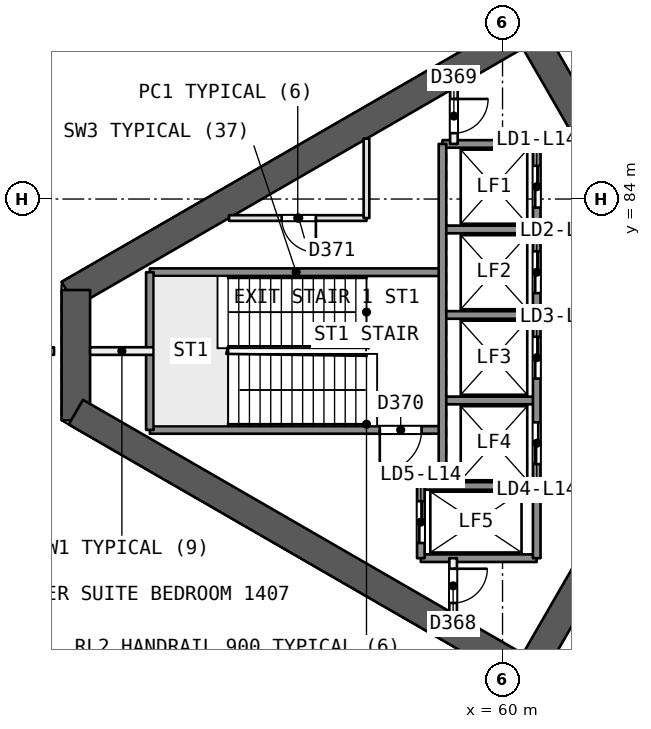
"""IFC4 building model, lengths in metres.
Left out: names, types, materials, properties, quantities, classifications, styles, units other than length and angle.
Written with IfcOpenShell. Run it as: python <this file> out.ifc"""

import sys

from ifc_helpers import new_model, si_unit, direction, frame, frame_2d, origin, place, context, subcontext, project, spatial, rectangle, extrude, element, fill, save


model = new_model("IFC4")
c1 = context("Model", 3, precision=1e-05, world=origin(), true_north=direction((0.0, 1.0)))
c2 = subcontext(c1, "Body", "Model", "MODEL_VIEW")
j1 = project(units=[si_unit("LENGTHUNIT", "METRE"), si_unit("PLANEANGLEUNIT", "RADIAN")], contexts=[c1])
p1 = place(None, origin())
s1 = spatial("IfcSite", under=j1, at=p1, CompositionType="ELEMENT")
p2 = place(p1, origin())
s2 = spatial("IfcBuilding", under=s1, at=p2, CompositionType="ELEMENT")
p3 = place(p2, frame((0.0, 0.0, 64.7)))
s3 = spatial("IfcBuildingStorey", under=s2, at=p3, CompositionType="ELEMENT", Elevation=64.7)
p4 = place(p3, frame((65.567, 80.0, 0.0), z_axis=(0.0, 0.0, 1.0), x_axis=(-0.499988615364, 0.866031976607, 0.0)))
e1 = element("IfcWall", 1, at=p4, inside=s3, PredefinedType="SHEAR", context=c2, shape_type="SweptSolid", body=[
    extrude(rectangle(XDim=10.163, YDim=0.75, at=frame_2d((5.082, 0.0))), origin(), (0.0, 0.0, 1.0), 3.7),
])
p5 = place(p4, frame((0.733, 0.0, 0.0)))
e2 = element("IfcOpeningElement", 2, at=p5, cuts=e1, PredefinedType="OPENING", context=c2, shape_type="SweptSolid", body=[
    extrude(rectangle(XDim=1.2, YDim=2.1, at=frame_2d((0.6, 1.05))), frame((0.0, 0.385, 0.0), z_axis=(0.0, -1.0, 0.0), x_axis=(1.0, 0.0, 0.0)), (0.0, 0.0, 1.0), 0.771),
])
p6 = place(p3, frame((60.673, 88.477, 0.0), z_axis=(0.0, 0.0, 1.0), x_axis=(-0.8660248072, -0.500001033313, 0.0)))
e3 = element("IfcWall", 3, at=p6, inside=s3, PredefinedType="SHEAR", context=c2, shape_type="SweptSolid", body=[
    extrude(rectangle(XDim=13.958, YDim=0.75, at=frame_2d((6.979, 0.0))), origin(), (0.0, 0.0, 1.0), 3.7),
])
p7 = place(p3, frame((48.772, 81.606, 0.0), z_axis=(0.0, 0.0, 1.0), x_axis=(0.0, -1.0, 0.0)))
e4 = element("IfcWall", 4, at=p7, inside=s3, PredefinedType="SHEAR", context=c2, shape_type="SweptSolid", body=[
    extrude(rectangle(XDim=3.429, YDim=0.75, at=frame_2d((1.714, 0.0))), origin(), (0.0, 0.0, 1.0), 3.7),
])
p8 = place(p3, frame((48.772, 78.394, 0.0), z_axis=(0.0, 0.0, 1.0), x_axis=(0.866028339916, -0.499994914436, 0.0)))
e5 = element("IfcWall", 5, at=p8, inside=s3, PredefinedType="SHEAR", context=c2, shape_type="SweptSolid", body=[
    extrude(rectangle(XDim=14.117, YDim=0.75, at=frame_2d((7.059, 0.0))), origin(), (0.0, 0.0, 1.0), 3.7),
])
p9 = place(p3, frame((60.673, 71.523, 0.0), z_axis=(0.0, 0.0, 1.0), x_axis=(0.499997052475, 0.866027105532, 0.0)))
e6 = element("IfcWall", 6, at=p9, inside=s3, PredefinedType="SHEAR", context=c2, shape_type="SweptSolid", body=[
    extrude(rectangle(XDim=10.005, YDim=0.75, at=frame_2d((5.002, 0.0))), origin(), (0.0, 0.0, 1.0), 3.7),
])
p10 = place(p9, frame((7.855, 0.0, 0.0)))
e7 = element("IfcOpeningElement", 7, at=p10, cuts=e6, PredefinedType="OPENING", context=c2, shape_type="SweptSolid", body=[
    extrude(rectangle(XDim=1.2, YDim=2.1, at=frame_2d((0.6, 1.05))), frame((0.0, 0.385, 0.0), z_axis=(0.0, -1.0, 0.0), x_axis=(1.0, 0.0, 0.0)), (0.0, 0.0, 1.0), 0.771),
])
p11 = place(p3, frame((38.851, 80.0, 0.0), z_axis=(0.0, 0.0, 1.0), x_axis=(1.0, 0.0, 0.0)))
e8 = element("IfcWall", 8, at=p11, inside=s3, PredefinedType="PARTITIONING", context=c2, shape_type="SweptSolid", body=[
    extrude(rectangle(XDim=9.347, YDim=0.2, at=frame_2d((4.674, 0.0))), origin(), (0.0, 0.0, 1.0), 3.2),
])
p12 = place(p3, frame((38.701, 83.06, 0.0), z_axis=(0.0, 0.0, 1.0), x_axis=(0.866026049211, 0.499998882086, 0.0)))
e9 = element("IfcWall", 9, at=p12, inside=s3, PredefinedType="SOLIDWALL", context=c2, shape_type="SweptSolid", body=[
    extrude(rectangle(XDim=59.811, YDim=0.3, at=frame_2d((29.905, 0.0))), origin(), (0.0, 0.0, 1.0), 3.2),
])
p13 = place(p12, frame((33.382, 0.0, 0.0)))
e10 = element("IfcOpeningElement", 10, at=p13, cuts=e9, PredefinedType="OPENING", context=c2, shape_type="SweptSolid", body=[
    extrude(rectangle(XDim=2.4, YDim=2.4, at=frame_2d((1.2, 1.2))), frame((0.0, 0.161, 0.0), z_axis=(0.0, -1.0, 0.0), x_axis=(1.0, 0.0, 0.0)), (0.0, 0.0, 1.0), 0.321),
])
p14 = place(p12, frame((46.394, 0.0, 0.0)))
e11 = element("IfcOpeningElement", 11, at=p14, cuts=e9, PredefinedType="OPENING", context=c2, shape_type="SweptSolid", body=[
    extrude(rectangle(XDim=2.4, YDim=2.4, at=frame_2d((1.2, 1.2))), frame((0.0, 0.161, 0.0), z_axis=(0.0, -1.0, 0.0), x_axis=(1.0, 0.0, 0.0)), (0.0, 0.0, 1.0), 0.321),
])
p15 = place(p12, frame((24.029, 0.0, 0.0)))
e12 = element("IfcOpeningElement", 12, at=p15, cuts=e9, PredefinedType="OPENING", context=c2, shape_type="SweptSolid", body=[
    extrude(rectangle(XDim=2.4, YDim=2.4, at=frame_2d((1.2, 1.2))), frame((0.0, 0.161, 0.0), z_axis=(0.0, -1.0, 0.0), x_axis=(1.0, 0.0, 0.0)), (0.0, 0.0, 1.0), 0.321),
])
p16 = place(p12, frame((11.002, 0.0, 0.0)))
e13 = element("IfcOpeningElement", 13, at=p16, cuts=e9, PredefinedType="OPENING", context=c2, shape_type="SweptSolid", body=[
    extrude(rectangle(XDim=2.4, YDim=2.4, at=frame_2d((1.2, 1.2))), frame((0.0, 0.161, 0.0), z_axis=(0.0, -1.0, 0.0), x_axis=(1.0, 0.0, 0.0)), (0.0, 0.0, 1.0), 0.321),
])
p17 = place(p12, frame((28.705, 0.0, 0.0)))
e14 = element("IfcOpeningElement", 14, at=p17, cuts=e9, PredefinedType="OPENING", context=c2, shape_type="SweptSolid", body=[
    extrude(rectangle(XDim=2.4, YDim=2.4, at=frame_2d((1.2, 1.2))), frame((0.0, 0.161, 0.0), z_axis=(0.0, -1.0, 0.0), x_axis=(1.0, 0.0, 0.0)), (0.0, 0.0, 1.0), 0.321),
])
p18 = place(p3, frame((90.499, 47.034, 0.0), z_axis=(0.0, 0.0, 1.0), x_axis=(-0.866026049211, 0.499998882086, 0.0)))
e15 = element("IfcWall", 15, at=p18, inside=s3, PredefinedType="SOLIDWALL", context=c2, shape_type="SweptSolid", body=[
    extrude(rectangle(XDim=59.811, YDim=0.3, at=frame_2d((29.905, 0.0))), origin(), (0.0, 0.0, 1.0), 3.2),
])
p19 = place(p18, frame((28.705, 0.0, 0.0)))
e16 = element("IfcOpeningElement", 16, at=p19, cuts=e15, PredefinedType="OPENING", context=c2, shape_type="SweptSolid", body=[
    extrude(rectangle(XDim=2.4, YDim=2.4, at=frame_2d((1.2, 1.2))), frame((0.0, 0.161, 0.0), z_axis=(0.0, -1.0, 0.0), x_axis=(1.0, 0.0, 0.0)), (0.0, 0.0, 1.0), 0.321),
])
p20 = place(p18, frame((34.161, 0.0, 0.0)))
e17 = element("IfcOpeningElement", 17, at=p20, cuts=e15, PredefinedType="OPENING", context=c2, shape_type="SweptSolid", body=[
    extrude(rectangle(XDim=2.4, YDim=2.4, at=frame_2d((1.2, 1.2))), frame((0.0, 0.161, 0.0), z_axis=(0.0, -1.0, 0.0), x_axis=(1.0, 0.0, 0.0)), (0.0, 0.0, 1.0), 0.321),
])
p21 = place(p18, frame((46.394, 0.0, 0.0)))
e18 = element("IfcOpeningElement", 18, at=p21, cuts=e15, PredefinedType="OPENING", context=c2, shape_type="SweptSolid", body=[
    extrude(rectangle(XDim=2.4, YDim=2.4, at=frame_2d((1.2, 1.2))), frame((0.0, 0.161, 0.0), z_axis=(0.0, -1.0, 0.0), x_axis=(1.0, 0.0, 0.0)), (0.0, 0.0, 1.0), 0.321),
])
p22 = place(p18, frame((23.249, 0.0, 0.0)))
e19 = element("IfcOpeningElement", 19, at=p22, cuts=e15, PredefinedType="OPENING", context=c2, shape_type="SweptSolid", body=[
    extrude(rectangle(XDim=2.4, YDim=2.4, at=frame_2d((1.2, 1.2))), frame((0.0, 0.161, 0.0), z_axis=(0.0, -1.0, 0.0), x_axis=(1.0, 0.0, 0.0)), (0.0, 0.0, 1.0), 0.321),
])
p23 = place(p18, frame((11.002, 0.0, 0.0)))
e20 = element("IfcOpeningElement", 20, at=p23, cuts=e15, PredefinedType="OPENING", context=c2, shape_type="SweptSolid", body=[
    extrude(rectangle(XDim=2.4, YDim=2.4, at=frame_2d((1.2, 1.2))), frame((0.0, 0.161, 0.0), z_axis=(0.0, -1.0, 0.0), x_axis=(1.0, 0.0, 0.0)), (0.0, 0.0, 1.0), 0.321),
])
p24 = place(p3, frame((60.9, 85.45, 0.0), z_axis=(0.0, 0.0, 1.0), x_axis=(-1.0, 0.0, 0.0)))
e21 = element("IfcWall", 21, at=p24, inside=s3, PredefinedType="SOLIDWALL", context=c2, shape_type="SweptSolid", body=[
    extrude(rectangle(XDim=2.48, YDim=0.2, at=frame_2d((1.24, 0.0))), origin(), (0.0, 0.0, 1.0), 3.2),
])
p25 = place(p3, frame((56.42, 83.5, 0.0), z_axis=(0.0, 0.0, 1.0), x_axis=(-1.0, 0.0, 0.0)))
e22 = element("IfcWall", 22, at=p25, inside=s3, PredefinedType="PARTITIONING", context=c2, shape_type="SweptSolid", body=[
    extrude(rectangle(XDim=3.618, YDim=0.15, at=frame_2d((1.809, 0.0))), origin(), (0.0, 0.0, 1.0), 3.2),
])
p26 = place(p25, frame((1.332, 0.0, 0.0)))
e23 = element("IfcOpeningElement", 23, at=p26, cuts=e22, PredefinedType="OPENING", context=c2, shape_type="SweptSolid", body=[
    extrude(rectangle(XDim=0.9, YDim=2.1, at=frame_2d((0.45, 1.05))), frame((0.0, 0.085, 0.0), z_axis=(0.0, -1.0, 0.0), x_axis=(1.0, 0.0, 0.0)), (0.0, 0.0, 1.0), 0.171),
])
p27 = place(p3, frame((60.9, 83.2, 0.0), z_axis=(0.0, 0.0, 1.0), x_axis=(-1.0, 0.0, 0.0)))
e24 = element("IfcWall", 24, at=p27, inside=s3, PredefinedType="SOLIDWALL", context=c2, shape_type="SweptSolid", body=[
    extrude(rectangle(XDim=2.48, YDim=0.2, at=frame_2d((1.24, 0.0))), origin(), (0.0, 0.0, 1.0), 3.2),
])
p28 = place(p3, frame((58.42, 82.075, 0.0), z_axis=(0.0, 0.0, 1.0), x_axis=(-1.0, 0.0, 0.0)))
e25 = element("IfcWall", 25, at=p28, inside=s3, PredefinedType="SOLIDWALL", context=c2, shape_type="SweptSolid", body=[
    extrude(rectangle(XDim=7.7, YDim=0.2, at=frame_2d((3.85, 0.0))), origin(), (0.0, 0.0, 1.0), 3.2),
])
p29 = place(p3, frame((60.9, 80.95, 0.0), z_axis=(0.0, 0.0, 1.0), x_axis=(-1.0, 0.0, 0.0)))
e26 = element("IfcWall", 26, at=p29, inside=s3, PredefinedType="SOLIDWALL", context=c2, shape_type="SweptSolid", body=[
    extrude(rectangle(XDim=2.48, YDim=0.2, at=frame_2d((1.24, 0.0))), origin(), (0.0, 0.0, 1.0), 3.2),
])
p30 = place(p3, frame((50.82, 80.0, 0.0), z_axis=(0.0, 0.0, 1.0), x_axis=(-1.0, 0.0, 0.0)))
e27 = element("IfcWall", 27, at=p30, inside=s3, PredefinedType="PARTITIONING", context=c2, shape_type="SweptSolid", body=[
    extrude(rectangle(XDim=1.673, YDim=0.2, at=frame_2d((0.836, 0.0))), origin(), (0.0, 0.0, 1.0), 3.2),
])
p31 = place(p3, frame((60.9, 78.7, 0.0), z_axis=(0.0, 0.0, 1.0), x_axis=(-1.0, 0.0, 0.0)))
e28 = element("IfcWall", 28, at=p31, inside=s3, PredefinedType="SOLIDWALL", context=c2, shape_type="SweptSolid", body=[
    extrude(rectangle(XDim=2.48, YDim=0.2, at=frame_2d((1.24, 0.0))), origin(), (0.0, 0.0, 1.0), 3.2),
])
p32 = place(p3, frame((58.42, 77.925, 0.0), z_axis=(0.0, 0.0, 1.0), x_axis=(-1.0, 0.0, 0.0)))
e29 = element("IfcWall", 29, at=p32, inside=s3, PredefinedType="SOLIDWALL", context=c2, shape_type="SweptSolid", body=[
    extrude(rectangle(XDim=7.7, YDim=0.2, at=frame_2d((3.85, 0.0))), origin(), (0.0, 0.0, 1.0), 3.2),
])
p33 = place(p32, frame((0.55, 0.0, 0.0)))
e30 = element("IfcOpeningElement", 30, at=p33, cuts=e29, PredefinedType="OPENING", context=c2, shape_type="SweptSolid", body=[
    extrude(rectangle(XDim=1.1, YDim=2.1, at=frame_2d((0.55, 1.05))), frame((0.0, 0.11, 0.0), z_axis=(0.0, -1.0, 0.0), x_axis=(1.0, 0.0, 0.0)), (0.0, 0.0, 1.0), 0.221),
])
for number, where, z_axis, x_axis in (
    (31, (60.9, 76.45, 0.0), (0.0, 0.0, 1.0), (-1.0, 0.0, 0.0)),
    (32, (60.9, 74.55, 0.0), (0.0, 0.0, 1.0), (-1.0, 0.0, 0.0)),
):
    element("IfcWall", number, at=place(p3, frame(where, z_axis=z_axis, x_axis=x_axis)), inside=s3, PredefinedType="SOLIDWALL", context=c2, shape_type="SweptSolid", body=[
        extrude(rectangle(XDim=3.05, YDim=0.2, at=frame_2d((1.525, 0.0))), origin(), (0.0, 0.0, 1.0), 3.2),
    ])
p34 = place(p3, frame((60.9, 85.45, 0.0), z_axis=(0.0, 0.0, 1.0), x_axis=(0.0, -1.0, 0.0)))
e33 = element("IfcWall", 33, at=p34, inside=s3, PredefinedType="SOLIDWALL", context=c2, shape_type="SweptSolid", body=[
    extrude(rectangle(XDim=10.9, YDim=0.2, at=frame_2d((5.45, 0.0))), origin(), (0.0, 0.0, 1.0), 3.2),
])
p35 = place(p34, frame((0.575, 0.0, 0.0)))
e34 = element("IfcOpeningElement", 34, at=p35, cuts=e33, PredefinedType="OPENING", context=c2, shape_type="SweptSolid", body=[
    extrude(rectangle(XDim=1.1, YDim=2.1, at=frame_2d((0.55, 1.05))), frame((0.0, 0.11, 0.0), z_axis=(0.0, -1.0, 0.0), x_axis=(1.0, 0.0, 0.0)), (0.0, 0.0, 1.0), 0.221),
])
p36 = place(p34, frame((2.825, 0.0, 0.0)))
e35 = element("IfcOpeningElement", 35, at=p36, cuts=e33, PredefinedType="OPENING", context=c2, shape_type="SweptSolid", body=[
    extrude(rectangle(XDim=1.1, YDim=2.1, at=frame_2d((0.55, 1.05))), frame((0.0, 0.11, 0.0), z_axis=(0.0, -1.0, 0.0), x_axis=(1.0, 0.0, 0.0)), (0.0, 0.0, 1.0), 0.221),
])
p37 = place(p34, frame((5.075, 0.0, 0.0)))
e36 = element("IfcOpeningElement", 36, at=p37, cuts=e33, PredefinedType="OPENING", context=c2, shape_type="SweptSolid", body=[
    extrude(rectangle(XDim=1.1, YDim=2.1, at=frame_2d((0.55, 1.05))), frame((0.0, 0.11, 0.0), z_axis=(0.0, -1.0, 0.0), x_axis=(1.0, 0.0, 0.0)), (0.0, 0.0, 1.0), 0.221),
])
p38 = place(p34, frame((7.325, 0.0, 0.0)))
e37 = element("IfcOpeningElement", 37, at=p38, cuts=e33, PredefinedType="OPENING", context=c2, shape_type="SweptSolid", body=[
    extrude(rectangle(XDim=1.1, YDim=2.1, at=frame_2d((0.55, 1.05))), frame((0.0, 0.11, 0.0), z_axis=(0.0, -1.0, 0.0), x_axis=(1.0, 0.0, 0.0)), (0.0, 0.0, 1.0), 0.221),
])
p39 = place(p3, frame((58.72, 86.917, 0.0), z_axis=(0.0, 0.0, 1.0), x_axis=(0.0, -1.0, 0.0)))
e38 = element("IfcWall", 38, at=p39, inside=s3, PredefinedType="PARTITIONING", context=c2, shape_type="SweptSolid", body=[
    extrude(rectangle(XDim=1.467, YDim=0.2, at=frame_2d((0.733, 0.0))), origin(), (0.0, 0.0, 1.0), 3.2),
])
p40 = place(p39, frame((0.283, 0.0, 0.0)))
e39 = element("IfcOpeningElement", 39, at=p40, cuts=e38, PredefinedType="OPENING", context=c2, shape_type="SweptSolid", body=[
    extrude(rectangle(XDim=0.9, YDim=2.1, at=frame_2d((0.45, 1.05))), frame((0.0, 0.11, 0.0), z_axis=(0.0, -1.0, 0.0), x_axis=(1.0, 0.0, 0.0)), (0.0, 0.0, 1.0), 0.221),
])
p41 = place(p3, frame((58.7, 74.55, 0.0), z_axis=(0.0, 0.0, 1.0), x_axis=(0.0, -1.0, 0.0)))
e40 = element("IfcWall", 40, at=p41, inside=s3, PredefinedType="PARTITIONING", context=c2, shape_type="SweptSolid", body=[
    extrude(rectangle(XDim=1.455, YDim=0.2, at=frame_2d((0.728, 0.0))), origin(), (0.0, 0.0, 1.0), 3.2),
])
p42 = place(p41, frame((0.278, 0.0, 0.0)))
e41 = element("IfcOpeningElement", 41, at=p42, cuts=e40, PredefinedType="OPENING", context=c2, shape_type="SweptSolid", body=[
    extrude(rectangle(XDim=0.9, YDim=2.1, at=frame_2d((0.45, 1.05))), frame((0.0, 0.11, 0.0), z_axis=(0.0, -1.0, 0.0), x_axis=(1.0, 0.0, 0.0)), (0.0, 0.0, 1.0), 0.221),
])
p43 = place(p3, frame((58.42, 85.45, 0.0), z_axis=(0.0, 0.0, 1.0), x_axis=(0.0, -1.0, 0.0)))
e42 = element("IfcWall", 42, at=p43, inside=s3, PredefinedType="SOLIDWALL", context=c2, shape_type="SweptSolid", body=[
    extrude(rectangle(XDim=9.0, YDim=0.2, at=frame_2d((4.5, 0.0))), origin(), (0.0, 0.0, 1.0), 3.2),
])
p44 = place(p3, frame((57.85, 76.45, 0.0), z_axis=(0.0, 0.0, 1.0), x_axis=(0.0, -1.0, 0.0)))
e43 = element("IfcWall", 43, at=p44, inside=s3, PredefinedType="SOLIDWALL", context=c2, shape_type="SweptSolid", body=[
    extrude(rectangle(XDim=1.9, YDim=0.2, at=frame_2d((0.95, 0.0))), origin(), (0.0, 0.0, 1.0), 3.2),
])
p45 = place(p44, frame((0.4, 0.0, 0.0)))
e44 = element("IfcOpeningElement", 44, at=p45, cuts=e43, PredefinedType="OPENING", context=c2, shape_type="SweptSolid", body=[
    extrude(rectangle(XDim=1.1, YDim=2.1, at=frame_2d((0.55, 1.05))), frame((0.0, 0.11, 0.0), z_axis=(0.0, -1.0, 0.0), x_axis=(1.0, 0.0, 0.0)), (0.0, 0.0, 1.0), 0.221),
])
p46 = place(p3, frame((56.42, 85.589, 0.0), z_axis=(0.0, 0.0, 1.0), x_axis=(0.0, -1.0, 0.0)))
e45 = element("IfcWall", 45, at=p46, inside=s3, PredefinedType="PARTITIONING", context=c2, shape_type="SweptSolid", body=[
    extrude(rectangle(XDim=2.089, YDim=0.15, at=frame_2d((1.044, 0.0))), origin(), (0.0, 0.0, 1.0), 3.2),
])
p47 = place(p3, frame((50.72, 82.075, 0.0), z_axis=(0.0, 0.0, 1.0), x_axis=(0.0, -1.0, 0.0)))
e46 = element("IfcWall", 46, at=p47, inside=s3, PredefinedType="SOLIDWALL", context=c2, shape_type="SweptSolid", body=[
    extrude(rectangle(XDim=4.15, YDim=0.2, at=frame_2d((2.075, 0.0))), origin(), (0.0, 0.0, 1.0), 3.2),
])
p48 = place(p35, origin())
e47 = element("IfcDoor", 47, at=p48, inside=s3, OperationType="SLIDING_TO_RIGHT", PredefinedType="NOTDEFINED", context=c2, shape_type="SweptSolid", body=[
    extrude(rectangle(XDim=1.1, YDim=2.1, at=frame_2d((0.55, 1.05))), frame((0.0, 0.025, 0.0), z_axis=(0.0, -1.0, 0.0), x_axis=(1.0, 0.0, 0.0)), (0.0, 0.0, 1.0), 0.05),
])
fill(e34, e47)
p49 = place(p36, origin())
e48 = element("IfcDoor", 48, at=p49, inside=s3, OperationType="SLIDING_TO_LEFT", PredefinedType="NOTDEFINED", context=c2, shape_type="SweptSolid", body=[
    extrude(rectangle(XDim=1.1, YDim=2.1, at=frame_2d((0.55, 1.05))), frame((0.0, 0.025, 0.0), z_axis=(0.0, -1.0, 0.0), x_axis=(1.0, 0.0, 0.0)), (0.0, 0.0, 1.0), 0.05),
])
fill(e35, e48)
p50 = place(p37, origin())
e49 = element("IfcDoor", 49, at=p50, inside=s3, OperationType="SLIDING_TO_RIGHT", PredefinedType="NOTDEFINED", context=c2, shape_type="SweptSolid", body=[
    extrude(rectangle(XDim=1.1, YDim=2.1, at=frame_2d((0.55, 1.05))), frame((0.0, 0.025, 0.0), z_axis=(0.0, -1.0, 0.0), x_axis=(1.0, 0.0, 0.0)), (0.0, 0.0, 1.0), 0.05),
])
fill(e36, e49)
p51 = place(p38, origin())
e50 = element("IfcDoor", 50, at=p51, inside=s3, OperationType="SLIDING_TO_LEFT", PredefinedType="NOTDEFINED", context=c2, shape_type="SweptSolid", body=[
    extrude(rectangle(XDim=1.1, YDim=2.1, at=frame_2d((0.55, 1.05))), frame((0.0, 0.025, 0.0), z_axis=(0.0, -1.0, 0.0), x_axis=(1.0, 0.0, 0.0)), (0.0, 0.0, 1.0), 0.05),
])
fill(e37, e50)
p52 = place(p45, origin())
e51 = element("IfcDoor", 51, at=p52, inside=s3, OperationType="SLIDING_TO_RIGHT", PredefinedType="NOTDEFINED", context=c2, shape_type="SweptSolid", body=[
    extrude(rectangle(XDim=1.1, YDim=2.1, at=frame_2d((0.55, 1.05))), frame((0.0, 0.025, 0.0), z_axis=(0.0, -1.0, 0.0), x_axis=(1.0, 0.0, 0.0)), (0.0, 0.0, 1.0), 0.05),
])
fill(e44, e51)
p53 = place(p42, origin())
e52 = element("IfcDoor", 52, at=p53, inside=s3, OperationType="SINGLE_SWING_LEFT", PredefinedType="NOTDEFINED", context=c2, shape_type="SweptSolid", body=[
    extrude(rectangle(XDim=0.9, YDim=2.1, at=frame_2d((0.45, 1.05))), frame((0.0, 0.025, 0.0), z_axis=(0.0, -1.0, 0.0), x_axis=(1.0, 0.0, 0.0)), (0.0, 0.0, 1.0), 0.05),
])
fill(e41, e52)
p54 = place(p40, origin())
e53 = element("IfcDoor", 53, at=p54, inside=s3, OperationType="SINGLE_SWING_LEFT", PredefinedType="NOTDEFINED", context=c2, shape_type="SweptSolid", body=[
    extrude(rectangle(XDim=0.9, YDim=2.1, at=frame_2d((0.45, 1.05))), frame((0.0, 0.025, 0.0), z_axis=(0.0, -1.0, 0.0), x_axis=(1.0, 0.0, 0.0)), (0.0, 0.0, 1.0), 0.05),
])
fill(e39, e53)
p55 = place(p33, origin())
e54 = element("IfcDoor", 54, at=p55, inside=s3, OperationType="SINGLE_SWING_RIGHT", PredefinedType="NOTDEFINED", context=c2, shape_type="SweptSolid", body=[
    extrude(rectangle(XDim=1.1, YDim=2.1, at=frame_2d((0.55, 1.05))), frame((0.0, 0.025, 0.0), z_axis=(0.0, -1.0, 0.0), x_axis=(1.0, 0.0, 0.0)), (0.0, 0.0, 1.0), 0.05),
])
fill(e30, e54)
p56 = place(p26, origin())
e55 = element("IfcDoor", 55, at=p56, inside=s3, OperationType="SINGLE_SWING_LEFT", PredefinedType="NOTDEFINED", context=c2, shape_type="SweptSolid", body=[
    extrude(rectangle(XDim=0.9, YDim=2.1, at=frame_2d((0.45, 1.05))), frame((0.0, 0.025, 0.0), z_axis=(0.0, -1.0, 0.0), x_axis=(1.0, 0.0, 0.0)), (0.0, 0.0, 1.0), 0.05),
])
fill(e23, e55)
save(model, sys.argv[1])
